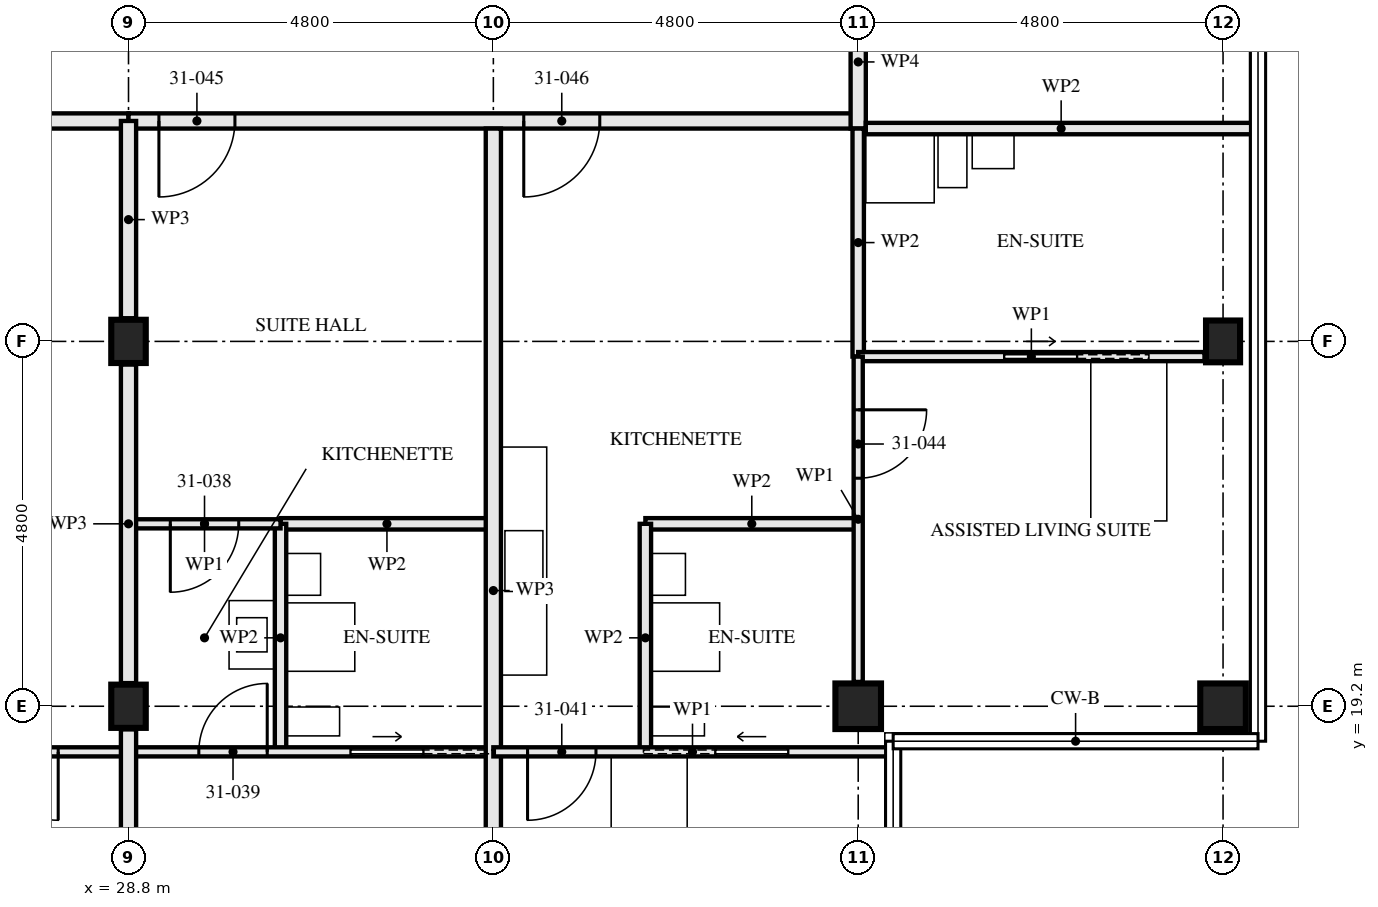
"""IFC4 building model, lengths in metres.
Left out: names, types, materials, properties, quantities, classifications, styles, units other than length and angle.
Written with IfcOpenShell. Run it as: python <this file> out.ifc"""

import sys

from ifc_helpers import new_model, si_unit, direction, frame, frame_2d, origin, origin_2d, place, context, subcontext, project, spatial, rectangle, hollow_rectangle, i_section, extrude, element, fill, save


model = new_model("IFC4")
c1 = context("Model", 3, precision=1e-05, world=origin(), true_north=direction((0.0, 1.0)))
c2 = subcontext(c1, "Body", "Model", "MODEL_VIEW")
j1 = project(units=[si_unit("LENGTHUNIT", "METRE"), si_unit("PLANEANGLEUNIT", "RADIAN")], contexts=[c1])
p1 = place(None, origin())
s1 = spatial("IfcSite", under=j1, at=p1, CompositionType="ELEMENT")
p2 = place(p1, origin())
s2 = spatial("IfcBuilding", under=s1, at=p2, CompositionType="ELEMENT")
p3 = place(p2, frame((0.0, 0.0, 115.5)))
s3 = spatial("IfcBuildingStorey", under=s2, at=p3, CompositionType="ELEMENT", Elevation=115.5)
for number, where, z_axis, x_axis in (
    (1, (28.8, 19.2, 0.0), (0.0, 0.0, 1.0), (1.0, 0.0, 0.0)),
    (2, (28.8, 24.0, 0.0), (0.0, 0.0, 1.0), (1.0, 0.0, 0.0)),
):
    element("IfcColumn", number, at=place(p3, frame(where, z_axis=z_axis, x_axis=x_axis)), inside=s3, PredefinedType="COLUMN", context=c2, shape_type="SweptSolid", body=[
        extrude(i_section(OverallWidth=0.454, OverallDepth=0.569, WebThickness=0.078, FlangeThickness=0.125, FilletRadius=0.015, at=origin_2d()), origin(), (0.0, 0.0, 1.0), 3.5),
    ])
for number, where, z_axis, x_axis in (
    (3, (38.4, 19.2, 0.0), (0.0, 0.0, 1.0), (0.0, 1.0, 0.0)),
    (4, (43.2, 19.2, 0.0), (0.0, 0.0, 1.0), (0.0, 1.0, 0.0)),
):
    element("IfcColumn", number, at=place(p3, frame(where, z_axis=z_axis, x_axis=x_axis)), inside=s3, PredefinedType="COLUMN", context=c2, shape_type="SweptSolid", body=[
        extrude(hollow_rectangle(XDim=0.6, YDim=0.6, WallThickness=0.05, at=origin_2d()), origin(), (0.0, 0.0, 1.0), 3.5),
    ])
p4 = place(p3, frame((43.2, 24.0, 0.0), z_axis=(0.0, 0.0, 1.0), x_axis=(1.0, 0.0, 0.0)))
e5 = element("IfcColumn", 5, at=p4, inside=s3, PredefinedType="COLUMN", context=c2, shape_type="SweptSolid", body=[
    extrude(i_section(OverallWidth=0.448, OverallDepth=0.55, WebThickness=0.072, FlangeThickness=0.115, FilletRadius=0.015, at=origin_2d()), origin(), (0.0, 0.0, 1.0), 3.5),
])
p5 = place(p3, frame((24.0, 18.6, 0.0), z_axis=(0.0, 0.0, 1.0), x_axis=(1.0, 0.0, 0.0)))
e6 = element("IfcWall", 6, at=p5, inside=s3, PredefinedType="PARTITIONING", context=c2, shape_type="SweptSolid", body=[
    extrude(rectangle(XDim=4.8, YDim=0.12, at=frame_2d((2.4, 0.0))), origin(), (0.0, 0.0, 1.0), 3.33),
])
p6 = place(p5, frame((2.975, 0.0, 0.0)))
e7 = element("IfcOpeningElement", 7, at=p6, cuts=e6, PredefinedType="OPENING", context=c2, shape_type="SweptSolid", body=[
    extrude(rectangle(XDim=0.9, YDim=2.1, at=frame_2d((0.45, 1.05))), frame((0.0, 0.071, 0.0), z_axis=(0.0, -1.0, 0.0), x_axis=(1.0, 0.0, 0.0)), (0.0, 0.0, 1.0), 0.141),
])
p7 = place(p5, frame((0.925, 0.0, 0.0)))
e8 = element("IfcOpeningElement", 8, at=p7, cuts=e6, PredefinedType="OPENING", context=c2, shape_type="SweptSolid", body=[
    extrude(rectangle(XDim=0.95, YDim=2.1, at=frame_2d((0.475, 1.05))), frame((0.0, 0.071, 0.0), z_axis=(0.0, -1.0, 0.0), x_axis=(1.0, 0.0, 0.0)), (0.0, 0.0, 1.0), 0.141),
])
p8 = place(p3, frame((13.96, 26.9, 0.0), z_axis=(0.0, 0.0, 1.0), x_axis=(1.0, 0.0, 0.0)))
e9 = element("IfcWall", 9, at=p8, inside=s3, PredefinedType="PARTITIONING", context=c2, shape_type="SweptSolid", body=[
    extrude(rectangle(XDim=14.84, YDim=0.2, at=frame_2d((7.42, 0.0))), origin(), (0.0, 0.0, 1.0), 2.32),
])
p9 = place(p8, frame((1.84, 0.0, 0.0)))
e10 = element("IfcOpeningElement", 10, at=p9, cuts=e9, PredefinedType="OPENING", context=c2, shape_type="SweptSolid", body=[
    extrude(rectangle(XDim=1.0, YDim=2.1, at=frame_2d((0.5, 1.05))), frame((0.0, 0.111, 0.0), z_axis=(0.0, -1.0, 0.0), x_axis=(1.0, 0.0, 0.0)), (0.0, 0.0, 1.0), 0.221),
])
p10 = place(p8, frame((4.09, 0.0, 0.0)))
e11 = element("IfcOpeningElement", 11, at=p10, cuts=e9, PredefinedType="OPENING", context=c2, shape_type="SweptSolid", body=[
    extrude(rectangle(XDim=0.9, YDim=2.1, at=frame_2d((0.45, 1.05))), frame((0.0, 0.111, 0.0), z_axis=(0.0, -1.0, 0.0), x_axis=(1.0, 0.0, 0.0)), (0.0, 0.0, 1.0), 0.221),
])
p11 = place(p8, frame((5.64, 0.0, 0.0)))
e12 = element("IfcOpeningElement", 12, at=p11, cuts=e9, PredefinedType="OPENING", context=c2, shape_type="SweptSolid", body=[
    extrude(rectangle(XDim=1.0, YDim=2.1, at=frame_2d((0.5, 1.05))), frame((0.0, 0.111, 0.0), z_axis=(0.0, -1.0, 0.0), x_axis=(1.0, 0.0, 0.0)), (0.0, 0.0, 1.0), 0.221),
])
p12 = place(p3, frame((30.8, 18.6, 0.0), z_axis=(0.0, 0.0, 1.0), x_axis=(0.0, 1.0, 0.0)))
e13 = element("IfcWall", 13, at=p12, inside=s3, PredefinedType="PARTITIONING", context=c2, shape_type="SweptSolid", body=[
    extrude(rectangle(XDim=3.0, YDim=0.15, at=frame_2d((1.5, 0.0))), origin(), (0.0, 0.0, 1.0), 2.55),
])
p13 = place(p3, frame((30.8, 21.6, 0.0), z_axis=(0.0, 0.0, 1.0), x_axis=(1.0, 0.0, 0.0)))
e14 = element("IfcWall", 14, at=p13, inside=s3, PredefinedType="PARTITIONING", context=c2, shape_type="SweptSolid", body=[
    extrude(rectangle(XDim=2.8, YDim=0.15, at=frame_2d((1.4, 0.0))), origin(), (0.0, 0.0, 1.0), 3.33),
])
p14 = place(p3, frame((28.8, 21.6, 0.0), z_axis=(0.0, 0.0, 1.0), x_axis=(1.0, 0.0, 0.0)))
e15 = element("IfcWall", 15, at=p14, inside=s3, PredefinedType="PARTITIONING", context=c2, shape_type="SweptSolid", body=[
    extrude(rectangle(XDim=2.0, YDim=0.12, at=frame_2d((1.0, 0.0))), origin(), (0.0, 0.0, 1.0), 3.33),
])
p15 = place(p14, frame((0.55, 0.0, 0.0)))
e16 = element("IfcOpeningElement", 16, at=p15, cuts=e15, PredefinedType="OPENING", context=c2, shape_type="SweptSolid", body=[
    extrude(rectangle(XDim=0.9, YDim=2.1, at=frame_2d((0.45, 1.05))), frame((0.0, 0.071, 0.0), z_axis=(0.0, -1.0, 0.0), x_axis=(1.0, 0.0, 0.0)), (0.0, 0.0, 1.0), 0.141),
])
p16 = place(p3, frame((28.8, 18.6, 0.0), z_axis=(0.0, 0.0, 1.0), x_axis=(1.0, 0.0, 0.0)))
e17 = element("IfcWall", 17, at=p16, inside=s3, PredefinedType="PARTITIONING", context=c2, shape_type="SweptSolid", body=[
    extrude(rectangle(XDim=4.8, YDim=0.12, at=frame_2d((2.4, 0.0))), origin(), (0.0, 0.0, 1.0), 3.33),
])
p17 = place(p16, frame((0.925, 0.0, 0.0)))
e18 = element("IfcOpeningElement", 18, at=p17, cuts=e17, PredefinedType="OPENING", context=c2, shape_type="SweptSolid", body=[
    extrude(rectangle(XDim=0.9, YDim=2.1, at=frame_2d((0.45, 1.05))), frame((0.0, 0.071, 0.0), z_axis=(0.0, -1.0, 0.0), x_axis=(1.0, 0.0, 0.0)), (0.0, 0.0, 1.0), 0.141),
])
p18 = place(p16, frame((2.925, 0.0, 0.0)))
e19 = element("IfcOpeningElement", 19, at=p18, cuts=e17, PredefinedType="OPENING", context=c2, shape_type="SweptSolid", body=[
    extrude(rectangle(XDim=0.95, YDim=2.1, at=frame_2d((0.475, 1.05))), frame((0.0, 0.071, 0.0), z_axis=(0.0, -1.0, 0.0), x_axis=(1.0, 0.0, 0.0)), (0.0, 0.0, 1.0), 0.141),
])
p19 = place(p3, frame((33.6, 14.644, 0.0), z_axis=(0.0, 0.0, 1.0), x_axis=(0.0, 1.0, 0.0)))
e20 = element("IfcWall", 20, at=p19, inside=s3, PredefinedType="PARTITIONING", context=c2, shape_type="SweptSolid", body=[
    extrude(rectangle(XDim=12.156, YDim=0.2, at=frame_2d((6.078, 0.0))), origin(), (0.0, 0.0, 1.0), 2.55),
])
p20 = place(p3, frame((35.6, 18.6, 0.0), z_axis=(0.0, 0.0, 1.0), x_axis=(0.0, 1.0, 0.0)))
e21 = element("IfcWall", 21, at=p20, inside=s3, PredefinedType="PARTITIONING", context=c2, shape_type="SweptSolid", body=[
    extrude(rectangle(XDim=3.0, YDim=0.15, at=frame_2d((1.5, 0.0))), origin(), (0.0, 0.0, 1.0), 2.55),
])
p21 = place(p3, frame((35.6, 21.6, 0.0), z_axis=(0.0, 0.0, 1.0), x_axis=(1.0, 0.0, 0.0)))
e22 = element("IfcWall", 22, at=p21, inside=s3, PredefinedType="PARTITIONING", context=c2, shape_type="SweptSolid", body=[
    extrude(rectangle(XDim=2.8, YDim=0.15, at=frame_2d((1.4, 0.0))), origin(), (0.0, 0.0, 1.0), 3.33),
])
p22 = place(p3, frame((38.4, 23.8, 0.0), z_axis=(0.0, 0.0, 1.0), x_axis=(0.0, 1.0, 0.0)))
e23 = element("IfcWall", 23, at=p22, inside=s3, PredefinedType="PARTITIONING", context=c2, shape_type="SweptSolid", body=[
    extrude(rectangle(XDim=3.0, YDim=0.15, at=frame_2d((1.5, 0.0))), origin(), (0.0, 0.0, 1.0), 2.55),
])
p23 = place(p3, frame((33.6, 18.6, 0.0), z_axis=(0.0, 0.0, 1.0), x_axis=(1.0, 0.0, 0.0)))
e24 = element("IfcWall", 24, at=p23, inside=s3, PredefinedType="PARTITIONING", context=c2, shape_type="SweptSolid", body=[
    extrude(rectangle(XDim=5.24, YDim=0.12, at=frame_2d((2.62, 0.0))), origin(), (0.0, 0.0, 1.0), 2.32),
])
p24 = place(p23, frame((0.45, 0.0, 0.0)))
e25 = element("IfcOpeningElement", 25, at=p24, cuts=e24, PredefinedType="OPENING", context=c2, shape_type="SweptSolid", body=[
    extrude(rectangle(XDim=0.9, YDim=2.1, at=frame_2d((0.45, 1.05))), frame((0.0, 0.071, 0.0), z_axis=(0.0, -1.0, 0.0), x_axis=(1.0, 0.0, 0.0)), (0.0, 0.0, 1.0), 0.141),
])
p25 = place(p23, frame((2.925, 0.0, 0.0)))
e26 = element("IfcOpeningElement", 26, at=p25, cuts=e24, PredefinedType="OPENING", context=c2, shape_type="SweptSolid", body=[
    extrude(rectangle(XDim=0.95, YDim=2.1, at=frame_2d((0.475, 1.05))), frame((0.0, 0.071, 0.0), z_axis=(0.0, -1.0, 0.0), x_axis=(1.0, 0.0, 0.0)), (0.0, 0.0, 1.0), 0.141),
])
p26 = place(p3, frame((38.4, 23.8, 0.0), z_axis=(0.0, 0.0, 1.0), x_axis=(1.0, 0.0, 0.0)))
e27 = element("IfcWall", 27, at=p26, inside=s3, PredefinedType="PARTITIONING", context=c2, shape_type="SweptSolid", body=[
    extrude(rectangle(XDim=4.556, YDim=0.12, at=frame_2d((2.278, 0.0))), origin(), (0.0, 0.0, 1.0), 3.33),
])
p27 = place(p26, frame((1.925, 0.0, 0.0)))
e28 = element("IfcOpeningElement", 28, at=p27, cuts=e27, PredefinedType="OPENING", context=c2, shape_type="SweptSolid", body=[
    extrude(rectangle(XDim=0.95, YDim=2.1, at=frame_2d((0.475, 1.05))), frame((0.0, 0.071, 0.0), z_axis=(0.0, -1.0, 0.0), x_axis=(1.0, 0.0, 0.0)), (0.0, 0.0, 1.0), 0.141),
])
p28 = place(p3, frame((38.4, 19.52, 0.0), z_axis=(0.0, 0.0, 1.0), x_axis=(0.0, 1.0, 0.0)))
e29 = element("IfcWall", 29, at=p28, inside=s3, PredefinedType="PARTITIONING", context=c2, shape_type="SweptSolid", body=[
    extrude(rectangle(XDim=4.28, YDim=0.12, at=frame_2d((2.14, 0.0))), origin(), (0.0, 0.0, 1.0), 3.33),
])
p29 = place(p28, frame((2.68, 0.0, 0.0)))
e30 = element("IfcOpeningElement", 30, at=p29, cuts=e29, PredefinedType="OPENING", context=c2, shape_type="SweptSolid", body=[
    extrude(rectangle(XDim=0.9, YDim=2.1, at=frame_2d((0.45, 1.05))), frame((0.0, 0.071, 0.0), z_axis=(0.0, -1.0, 0.0), x_axis=(1.0, 0.0, 0.0)), (0.0, 0.0, 1.0), 0.141),
])
p30 = place(p3, frame((28.8, 26.9, 0.0), z_axis=(0.0, 0.0, 1.0), x_axis=(1.0, 0.0, 0.0)))
e31 = element("IfcWall", 31, at=p30, inside=s3, PredefinedType="PARTITIONING", context=c2, shape_type="SweptSolid", body=[
    extrude(rectangle(XDim=9.6, YDim=0.2, at=frame_2d((4.8, 0.0))), origin(), (0.0, 0.0, 1.0), 3.33),
])
p31 = place(p30, frame((0.4, 0.0, 0.0)))
e32 = element("IfcOpeningElement", 32, at=p31, cuts=e31, PredefinedType="OPENING", context=c2, shape_type="SweptSolid", body=[
    extrude(rectangle(XDim=1.0, YDim=2.1, at=frame_2d((0.5, 1.05))), frame((0.0, 0.111, 0.0), z_axis=(0.0, -1.0, 0.0), x_axis=(1.0, 0.0, 0.0)), (0.0, 0.0, 1.0), 0.221),
])
p32 = place(p30, frame((5.2, 0.0, 0.0)))
e33 = element("IfcOpeningElement", 33, at=p32, cuts=e31, PredefinedType="OPENING", context=c2, shape_type="SweptSolid", body=[
    extrude(rectangle(XDim=1.0, YDim=2.1, at=frame_2d((0.5, 1.05))), frame((0.0, 0.111, 0.0), z_axis=(0.0, -1.0, 0.0), x_axis=(1.0, 0.0, 0.0)), (0.0, 0.0, 1.0), 0.221),
])
p33 = place(p3, frame((38.4, 26.8, 0.0), z_axis=(0.0, 0.0, 1.0), x_axis=(0.0, 1.0, 0.0)))
e34 = element("IfcWall", 34, at=p33, inside=s3, PredefinedType="PARTITIONING", context=c2, shape_type="SweptSolid", body=[
    extrude(rectangle(XDim=1.753, YDim=0.2, at=frame_2d((0.876, 0.0))), origin(), (0.0, 0.0, 1.0), 3.33),
])
p34 = place(p3, frame((28.8, 14.644, 0.0), z_axis=(0.0, 0.0, 1.0), x_axis=(0.0, 1.0, 0.0)))
e35 = element("IfcWall", 35, at=p34, inside=s3, PredefinedType="PARTITIONING", context=c2, shape_type="SweptSolid", body=[
    extrude(rectangle(XDim=4.251, YDim=0.2, at=frame_2d((2.126, 0.0))), origin(), (0.0, 0.0, 1.0), 2.32),
])
p35 = place(p3, frame((28.8, 19.504, 0.0), z_axis=(0.0, 0.0, 1.0), x_axis=(0.0, 1.0, 0.0)))
e36 = element("IfcWall", 36, at=p35, inside=s3, PredefinedType="PARTITIONING", context=c2, shape_type="SweptSolid", body=[
    extrude(rectangle(XDim=4.191, YDim=0.2, at=frame_2d((2.096, 0.0))), origin(), (0.0, 0.0, 1.0), 2.32),
])
p36 = place(p3, frame((28.8, 24.304, 0.0), z_axis=(0.0, 0.0, 1.0), x_axis=(0.0, 1.0, 0.0)))
e37 = element("IfcWall", 37, at=p36, inside=s3, PredefinedType="PARTITIONING", context=c2, shape_type="SweptSolid", body=[
    extrude(rectangle(XDim=2.595, YDim=0.2, at=frame_2d((1.298, 0.0))), origin(), (0.0, 0.0, 1.0), 2.32),
])
p37 = place(p3, frame((38.5, 26.8, 0.0), z_axis=(0.0, 0.0, 1.0), x_axis=(1.0, 0.0, 0.0)))
e38 = element("IfcWall", 38, at=p37, inside=s3, PredefinedType="PARTITIONING", context=c2, shape_type="SweptSolid", body=[
    extrude(rectangle(XDim=5.14, YDim=0.15, at=frame_2d((2.57, 0.0))), origin(), (0.0, 0.0, 1.0), 2.32),
])
p38 = place(p6, frame((0.9, 0.0, 0.0), z_axis=(0.0, 0.0, 1.0), x_axis=(-1.0, 0.0, 0.0)))
e39 = element("IfcDoor", 39, at=p38, inside=s3, OperationType="SINGLE_SWING_RIGHT", PredefinedType="DOOR", context=c2, shape_type="SweptSolid", body=[
    extrude(rectangle(XDim=0.9, YDim=2.1, at=frame_2d((0.45, 1.05))), frame((0.0, 0.022, 0.0), z_axis=(0.0, -1.0, 0.0), x_axis=(1.0, 0.0, 0.0)), (0.0, 0.0, 1.0), 0.044),
])
fill(e7, e39)
p39 = place(p15, frame((0.9, 0.0, 0.0), z_axis=(0.0, 0.0, 1.0), x_axis=(-1.0, 0.0, 0.0)))
e40 = element("IfcDoor", 40, at=p39, inside=s3, OperationType="SINGLE_SWING_LEFT", PredefinedType="DOOR", context=c2, shape_type="SweptSolid", body=[
    extrude(rectangle(XDim=0.9, YDim=2.1, at=frame_2d((0.45, 1.05))), frame((0.0, 0.022, 0.0), z_axis=(0.0, -1.0, 0.0), x_axis=(1.0, 0.0, 0.0)), (0.0, 0.0, 1.0), 0.044),
])
fill(e16, e40)
p40 = place(p17, origin())
e41 = element("IfcDoor", 41, at=p40, inside=s3, OperationType="SINGLE_SWING_LEFT", PredefinedType="DOOR", context=c2, shape_type="SweptSolid", body=[
    extrude(rectangle(XDim=0.9, YDim=2.1, at=frame_2d((0.45, 1.05))), frame((0.0, 0.022, 0.0), z_axis=(0.0, -1.0, 0.0), x_axis=(1.0, 0.0, 0.0)), (0.0, 0.0, 1.0), 0.044),
])
fill(e18, e41)
p41 = place(p18, origin())
e42 = element("IfcDoor", 42, at=p41, inside=s3, OperationType="SLIDING_TO_LEFT", PredefinedType="DOOR", context=c2, shape_type="SweptSolid", body=[
    extrude(rectangle(XDim=0.95, YDim=2.1, at=frame_2d((0.475, 1.05))), frame((0.0, 0.022, 0.0), z_axis=(0.0, -1.0, 0.0), x_axis=(1.0, 0.0, 0.0)), (0.0, 0.0, 1.0), 0.044),
])
fill(e19, e42)
p42 = place(p24, frame((0.9, 0.0, 0.0), z_axis=(0.0, 0.0, 1.0), x_axis=(-1.0, 0.0, 0.0)))
e43 = element("IfcDoor", 43, at=p42, inside=s3, OperationType="SINGLE_SWING_LEFT", PredefinedType="DOOR", context=c2, shape_type="SweptSolid", body=[
    extrude(rectangle(XDim=0.9, YDim=2.1, at=frame_2d((0.45, 1.05))), frame((0.0, 0.022, 0.0), z_axis=(0.0, -1.0, 0.0), x_axis=(1.0, 0.0, 0.0)), (0.0, 0.0, 1.0), 0.044),
])
fill(e25, e43)
p43 = place(p25, origin())
e44 = element("IfcDoor", 44, at=p43, inside=s3, OperationType="SLIDING_TO_RIGHT", PredefinedType="DOOR", context=c2, shape_type="SweptSolid", body=[
    extrude(rectangle(XDim=0.95, YDim=2.1, at=frame_2d((0.475, 1.05))), frame((0.0, 0.022, 0.0), z_axis=(0.0, -1.0, 0.0), x_axis=(1.0, 0.0, 0.0)), (0.0, 0.0, 1.0), 0.044),
])
fill(e26, e44)
p44 = place(p27, origin())
e45 = element("IfcDoor", 45, at=p44, inside=s3, OperationType="SLIDING_TO_LEFT", PredefinedType="DOOR", context=c2, shape_type="SweptSolid", body=[
    extrude(rectangle(XDim=0.95, YDim=2.1, at=frame_2d((0.475, 1.05))), frame((0.0, 0.022, 0.0), z_axis=(0.0, -1.0, 0.0), x_axis=(1.0, 0.0, 0.0)), (0.0, 0.0, 1.0), 0.044),
])
fill(e28, e45)
p45 = place(p29, frame((0.9, 0.0, 0.0), z_axis=(0.0, 0.0, 1.0), x_axis=(-1.0, 0.0, 0.0)))
e46 = element("IfcDoor", 46, at=p45, inside=s3, OperationType="SINGLE_SWING_RIGHT", PredefinedType="DOOR", context=c2, shape_type="SweptSolid", body=[
    extrude(rectangle(XDim=0.9, YDim=2.1, at=frame_2d((0.45, 1.05))), frame((0.0, 0.022, 0.0), z_axis=(0.0, -1.0, 0.0), x_axis=(1.0, 0.0, 0.0)), (0.0, 0.0, 1.0), 0.044),
])
fill(e30, e46)
p46 = place(p31, frame((1.0, 0.0, 0.0), z_axis=(0.0, 0.0, 1.0), x_axis=(-1.0, 0.0, 0.0)))
e47 = element("IfcDoor", 47, at=p46, inside=s3, OperationType="SINGLE_SWING_LEFT", PredefinedType="DOOR", context=c2, shape_type="SweptSolid", body=[
    extrude(rectangle(XDim=1.0, YDim=2.1, at=frame_2d((0.5, 1.05))), frame((0.0, 0.027, 0.0), z_axis=(0.0, -1.0, 0.0), x_axis=(1.0, 0.0, 0.0)), (0.0, 0.0, 1.0), 0.054),
])
fill(e32, e47)
p47 = place(p32, frame((1.0, 0.0, 0.0), z_axis=(0.0, 0.0, 1.0), x_axis=(-1.0, 0.0, 0.0)))
e48 = element("IfcDoor", 48, at=p47, inside=s3, OperationType="SINGLE_SWING_LEFT", PredefinedType="DOOR", context=c2, shape_type="SweptSolid", body=[
    extrude(rectangle(XDim=1.0, YDim=2.1, at=frame_2d((0.5, 1.05))), frame((0.0, 0.027, 0.0), z_axis=(0.0, -1.0, 0.0), x_axis=(1.0, 0.0, 0.0)), (0.0, 0.0, 1.0), 0.054),
])
fill(e33, e48)
save(model, sys.argv[1])
